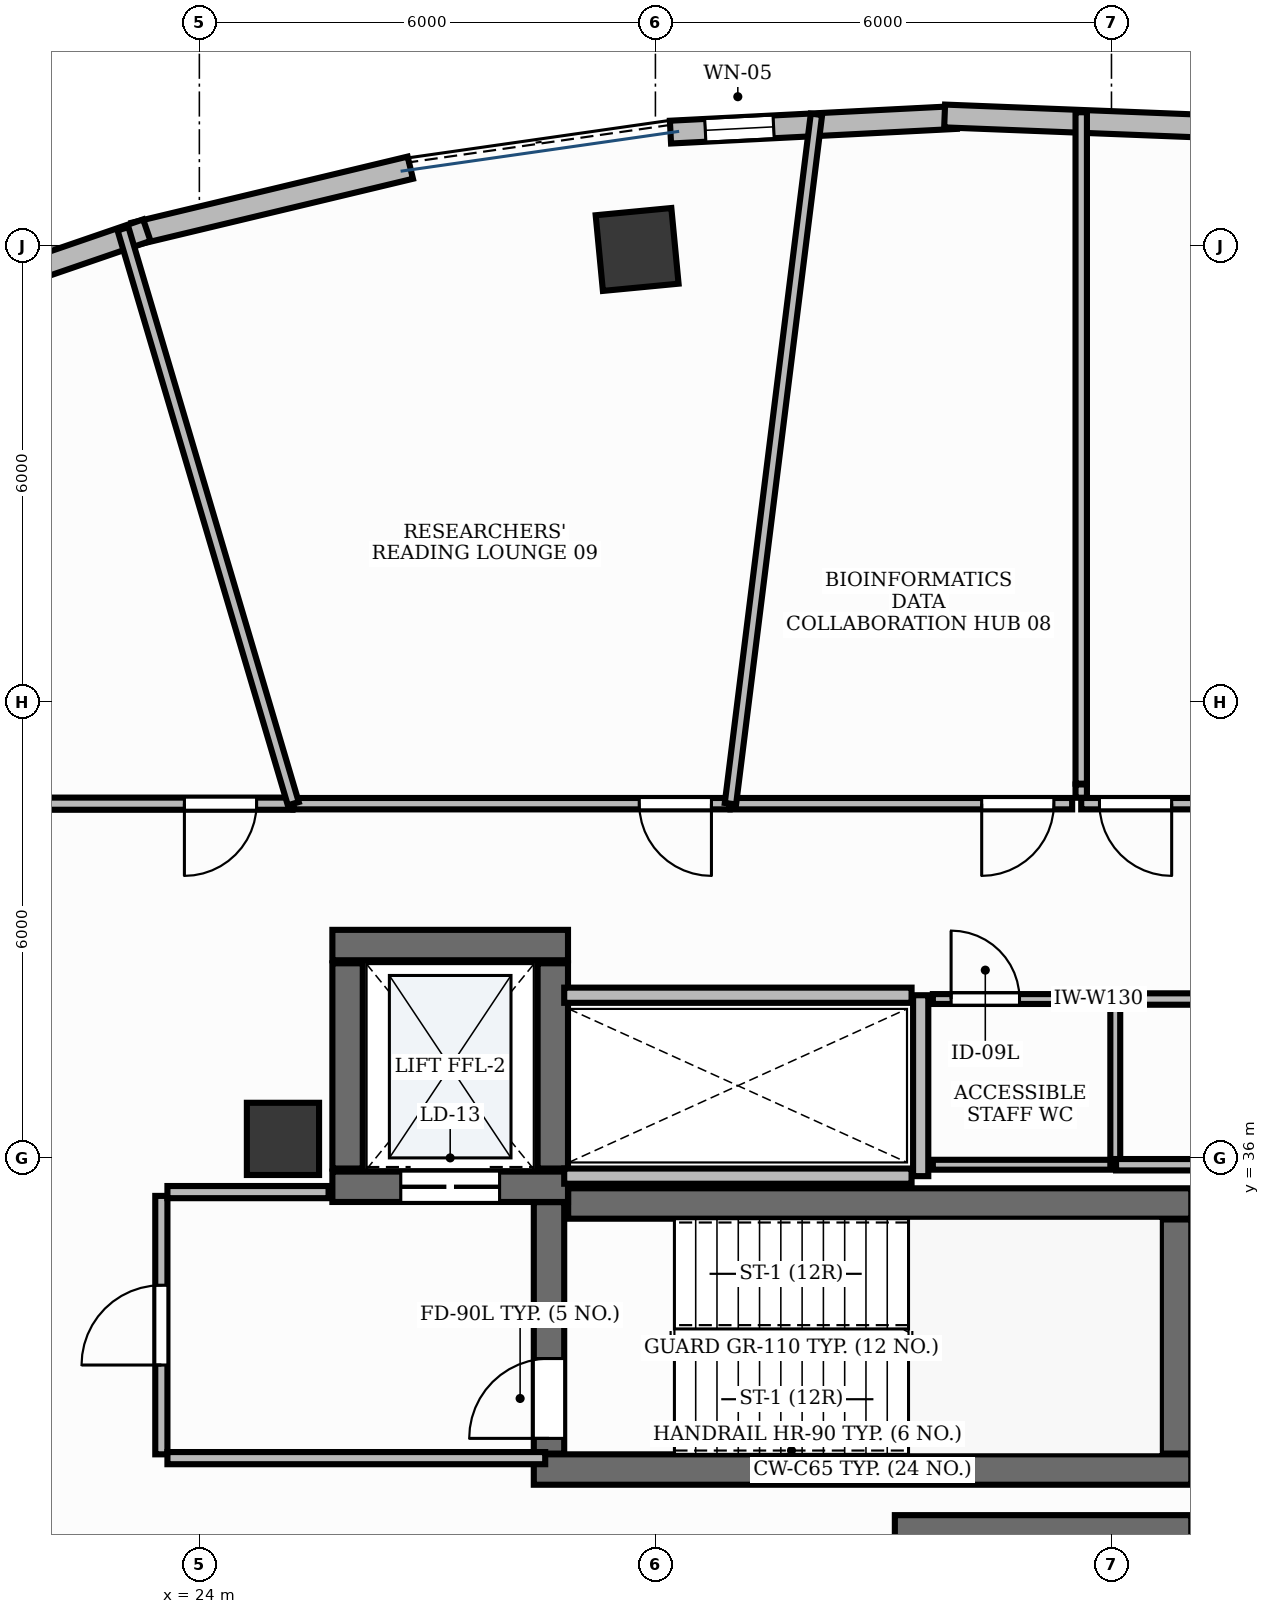
"""IFC4 building model, lengths in metres.
Left out: names, types, materials, properties, quantities, classifications, styles, units other than length and angle.
Written with IfcOpenShell. Run it as: python <this file> out.ifc"""

import sys

from ifc_helpers import new_model, si_unit, direction, frame, frame_2d, origin, origin_2d, place, context, subcontext, project, spatial, rectangle, extrude, element, fill, save


model = new_model("IFC4")
c1 = context("Model", 3, precision=1e-05, world=origin(), true_north=direction((0.0, 1.0)))
c2 = subcontext(c1, "Body", "Model", "MODEL_VIEW")
j1 = project(units=[si_unit("LENGTHUNIT", "METRE"), si_unit("PLANEANGLEUNIT", "RADIAN")], contexts=[c1])
p1 = place(None, origin())
s1 = spatial("IfcSite", under=j1, at=p1, CompositionType="ELEMENT")
p2 = place(p1, origin())
s2 = spatial("IfcBuilding", under=s1, at=p2, CompositionType="ELEMENT")
p3 = place(p2, frame((0.0, 0.0, 226.8)))
s3 = spatial("IfcBuildingStorey", under=s2, at=p3, CompositionType="ELEMENT", Elevation=226.8)
p4 = place(p3, frame((28.852, 35.4, 0.0), z_axis=(0.0, 0.0, 1.0), x_axis=(1.0, 0.0, 0.0)))
e1 = element("IfcWall", 1, at=p4, inside=s3, PredefinedType="SHEAR", context=c2, shape_type="SweptSolid", body=[
    extrude(rectangle(XDim=8.198, YDim=0.4, at=frame_2d((4.099, 0.0))), origin(), (0.0, 0.0, 1.0), 3.9),
])
p5 = place(p3, frame((28.4, 31.9, 0.0), z_axis=(0.0, 0.0, 1.0), x_axis=(1.0, 0.0, 0.0)))
e2 = element("IfcWall", 2, at=p5, inside=s3, PredefinedType="SHEAR", context=c2, shape_type="SweptSolid", body=[
    extrude(rectangle(XDim=8.65, YDim=0.4, at=frame_2d((4.325, 0.0))), origin(), (0.0, 0.0, 1.0), 3.9),
])
p6 = place(p3, frame((36.85, 32.11, 0.0), z_axis=(0.0, 0.0, 1.0), x_axis=(0.0, 1.0, 0.0)))
e3 = element("IfcWall", 3, at=p6, inside=s3, PredefinedType="SHEAR", context=c2, shape_type="SweptSolid", body=[
    extrude(rectangle(XDim=3.08, YDim=0.4, at=frame_2d((1.54, 0.0))), origin(), (0.0, 0.0, 1.0), 3.9),
])
p7 = place(p3, frame((28.6, 32.11, 0.0), z_axis=(0.0, 0.0, 1.0), x_axis=(0.0, 1.0, 0.0)))
e4 = element("IfcWall", 4, at=p7, inside=s3, PredefinedType="SHEAR", context=c2, shape_type="SweptSolid", body=[
    extrude(rectangle(XDim=3.308, YDim=0.4, at=frame_2d((1.654, 0.0))), origin(), (0.0, 0.0, 1.0), 3.9),
])
p8 = place(p7, frame((0.2, 0.0, 0.0)))
e5 = element("IfcOpeningElement", 5, at=p8, cuts=e4, PredefinedType="OPENING", context=c2, shape_type="SweptSolid", body=[
    extrude(rectangle(XDim=1.05, YDim=2.15, at=frame_2d((0.525, 1.075))), frame((0.0, 0.215, 0.0), z_axis=(0.0, -1.0, 0.0), x_axis=(1.0, 0.0, 0.0)), (0.0, 0.0, 1.0), 0.43),
])
p9 = place(p3, frame((33.15, 31.1, 0.0), z_axis=(0.0, 0.0, 1.0), x_axis=(1.0, 0.0, 0.0)))
e6 = element("IfcWall", 6, at=p9, inside=s3, PredefinedType="SHEAR", context=c2, shape_type="SweptSolid", body=[
    extrude(rectangle(XDim=3.9, YDim=0.4, at=frame_2d((1.95, 0.0))), origin(), (0.0, 0.0, 1.0), 3.9),
])
p10 = place(p3, frame((25.75, 38.8, 0.0), z_axis=(0.0, 0.0, 1.0), x_axis=(1.0, 0.0, 0.0)))
e7 = element("IfcWall", 7, at=p10, inside=s3, PredefinedType="SHEAR", context=c2, shape_type="SweptSolid", body=[
    extrude(rectangle(XDim=3.1, YDim=0.4, at=frame_2d((1.55, 0.0))), origin(), (0.0, 0.0, 1.0), 3.9),
])
p11 = place(p3, frame((25.75, 35.62, 0.0), z_axis=(0.0, 0.0, 1.0), x_axis=(1.0, 0.0, 0.0)))
e8 = element("IfcWall", 8, at=p11, inside=s3, PredefinedType="SHEAR", context=c2, shape_type="SweptSolid", body=[
    extrude(rectangle(XDim=3.1, YDim=0.4, at=frame_2d((1.55, 0.0))), origin(), (0.0, 0.0, 1.0), 3.9),
])
p12 = place(p11, frame((0.9, 0.0, 0.0)))
e9 = element("IfcOpeningElement", 9, at=p12, cuts=e8, PredefinedType="OPENING", context=c2, shape_type="SweptSolid", body=[
    extrude(rectangle(XDim=1.3, YDim=2.2, at=frame_2d((0.65, 1.1))), frame((0.0, 0.215, 0.0), z_axis=(0.0, -1.0, 0.0), x_axis=(1.0, 0.0, 0.0)), (0.0, 0.0, 1.0), 0.43),
])
for number, where, z_axis, x_axis in (
    (10, (25.95, 35.86, 0.0), (0.0, 0.0, 1.0), (0.0, 1.0, 0.0)),
    (11, (28.65, 35.86, 0.0), (0.0, 0.0, 1.0), (0.0, 1.0, 0.0)),
):
    element("IfcWall", number, at=place(p3, frame(where, z_axis=z_axis, x_axis=x_axis)), inside=s3, PredefinedType="SHEAR", context=c2, shape_type="SweptSolid", body=[
        extrude(rectangle(XDim=2.7, YDim=0.4, at=frame_2d((1.35, 0.0))), origin(), (0.0, 0.0, 1.0), 3.9),
    ])
p13 = place(p3, frame((25.1, 36.25, -0.0), z_axis=(0.0, 0.0, 1.0), x_axis=(1.0, 0.0, 0.0)))
e12 = element("IfcColumn", 12, at=p13, inside=s3, PredefinedType="PILASTER", context=c2, shape_type="SweptSolid", body=[
    extrude(rectangle(XDim=0.95, YDim=0.95, at=origin_2d()), origin(), (0.0, 0.0, 1.0), 3.901),
])
p14 = place(p3, frame((29.759, 47.951, -0.0), z_axis=(0.0, 0.0, 1.0), x_axis=(0.995462868748, 0.095150811579, 0.0)))
e13 = element("IfcColumn", 13, at=p14, inside=s3, PredefinedType="COLUMN", context=c2, shape_type="SweptSolid", body=[
    extrude(rectangle(XDim=1.0, YDim=1.0, at=origin_2d()), origin(), (0.0, 0.0, 1.0), 3.901),
])
p15 = place(p3, frame((33.958, 49.688, 0.0), z_axis=(0.0, 0.0, 1.0), x_axis=(-0.998693948377, -0.051092049037, 0.0)))
e14 = element("IfcWall", 14, at=p15, inside=s3, PredefinedType="STANDARD", context=c2, shape_type="SweptSolid", body=[
    extrude(rectangle(XDim=3.765, YDim=0.3, at=frame_2d((1.883, 0.0))), origin(), (0.0, 0.0, 1.0), 3.47),
])
p16 = place(p15, frame((2.407, 0.0, 0.95)))
e15 = element("IfcOpeningElement", 15, at=p16, cuts=e14, PredefinedType="OPENING", context=c2, shape_type="SweptSolid", body=[
    extrude(rectangle(XDim=0.9, YDim=1.8, at=frame_2d((0.45, 0.9))), frame((0.0, 0.165, 0.0), z_axis=(0.0, -1.0, 0.0), x_axis=(1.0, 0.0, 0.0)), (0.0, 0.0, 1.0), 0.33),
])
p17 = place(p3, frame((37.609, 49.557, 0.0), z_axis=(0.0, 0.0, 1.0), x_axis=(-0.999221923177, 0.039440439173, 0.0)))
e16 = element("IfcWall", 16, at=p17, inside=s3, PredefinedType="STANDARD", context=c2, shape_type="SweptSolid", body=[
    extrude(rectangle(XDim=3.807, YDim=0.3, at=frame_2d((1.903, 0.0))), origin(), (0.0, 0.0, 1.0), 3.9),
])
p18 = place(p3, frame((26.775, 49.027, 0.0), z_axis=(0.0, 0.0, 1.0), x_axis=(-0.972475629939, -0.233004611918, 0.0)))
e17 = element("IfcWall", 17, at=p18, inside=s3, PredefinedType="STANDARD", context=c2, shape_type="SweptSolid", body=[
    extrude(rectangle(XDim=3.735, YDim=0.3, at=frame_2d((1.868, 0.0))), origin(), (0.0, 0.0, 1.0), 3.9),
])
p19 = place(p3, frame((23.309, 48.205, 0.0), z_axis=(0.0, 0.0, 1.0), x_axis=(-0.945722383555, -0.32497565023, 0.0)))
e18 = element("IfcWall", 18, at=p19, inside=s3, PredefinedType="STANDARD", context=c2, shape_type="SweptSolid", body=[
    extrude(rectangle(XDim=3.67, YDim=0.3, at=frame_2d((1.835, 0.0))), origin(), (0.0, 0.0, 1.0), 3.9),
])
p20 = place(p3, frame((33.49, 35.76, 0.0), z_axis=(0.0, 0.0, 1.0), x_axis=(0.0, 1.0, 0.0)))
e19 = element("IfcWall", 19, at=p20, inside=s3, PredefinedType="PARTITIONING", context=c2, shape_type="SweptSolid", body=[
    extrude(rectangle(XDim=2.38, YDim=0.2, at=frame_2d((1.19, 0.0))), origin(), (0.0, 0.0, 1.0), 2.91),
])
for number, where, z_axis, x_axis in (
    (20, (28.8, 35.76, 0.0), (0.0, 0.0, 1.0), (1.0, 0.0, 0.0)),
    (21, (28.8, 38.14, 0.0), (0.0, 0.0, 1.0), (1.0, 0.0, 0.0)),
):
    element("IfcWall", number, at=place(p3, frame(where, z_axis=z_axis, x_axis=x_axis)), inside=s3, PredefinedType="PARTITIONING", context=c2, shape_type="SweptSolid", body=[
        extrude(rectangle(XDim=4.57, YDim=0.2, at=frame_2d((2.285, 0.0))), origin(), (0.0, 0.0, 1.0), 2.91),
    ])
p21 = place(p3, frame((23.5, 32.1, 0.0), z_axis=(0.0, 0.0, 1.0), x_axis=(0.0, 1.0, 0.0)))
e22 = element("IfcWall", 22, at=p21, inside=s3, PredefinedType="PARTITIONING", context=c2, shape_type="SweptSolid", body=[
    extrude(rectangle(XDim=3.4, YDim=0.16, at=frame_2d((1.7, 0.0))), origin(), (0.0, 0.0, 1.0), 2.91),
])
p22 = place(p21, frame((1.175, 0.0, 0.0)))
e23 = element("IfcOpeningElement", 23, at=p22, cuts=e22, PredefinedType="OPENING", context=c2, shape_type="SweptSolid", body=[
    extrude(rectangle(XDim=1.05, YDim=2.15, at=frame_2d((0.525, 1.075))), frame((0.0, 0.095, 0.0), z_axis=(0.0, -1.0, 0.0), x_axis=(1.0, 0.0, 0.0)), (0.0, 0.0, 1.0), 0.19),
])
p23 = place(p3, frame((23.58, 32.05, 0.0), z_axis=(0.0, 0.0, 1.0), x_axis=(1.0, 0.0, 0.0)))
e24 = element("IfcWall", 24, at=p23, inside=s3, PredefinedType="PARTITIONING", context=c2, shape_type="SweptSolid", body=[
    extrude(rectangle(XDim=4.97, YDim=0.16, at=frame_2d((2.485, 0.0))), origin(), (0.0, 0.0, 1.0), 2.91),
])
p24 = place(p3, frame((23.58, 35.55, 0.0), z_axis=(0.0, 0.0, 1.0), x_axis=(1.0, 0.0, 0.0)))
e25 = element("IfcWall", 25, at=p24, inside=s3, PredefinedType="PARTITIONING", context=c2, shape_type="SweptSolid", body=[
    extrude(rectangle(XDim=2.12, YDim=0.16, at=frame_2d((1.06, 0.0))), origin(), (0.0, 0.0, 1.0), 2.91),
])
p25 = place(p3, frame((33.65, 38.09, 0.0), z_axis=(0.0, 0.0, 1.0), x_axis=(1.0, 0.0, 0.0)))
e26 = element("IfcWall", 26, at=p25, inside=s3, PredefinedType="PARTITIONING", context=c2, shape_type="SweptSolid", body=[
    extrude(rectangle(XDim=2.4, YDim=0.13, at=frame_2d((1.2, 0.0))), origin(), (0.0, 0.0, 1.0), 2.91),
])
p26 = place(p25, frame((0.24, 0.0, 0.0)))
e27 = element("IfcOpeningElement", 27, at=p26, cuts=e26, PredefinedType="OPENING", context=c2, shape_type="SweptSolid", body=[
    extrude(rectangle(XDim=0.9, YDim=2.15, at=frame_2d((0.45, 1.075))), frame((0.0, 0.08, 0.0), z_axis=(0.0, -1.0, 0.0), x_axis=(1.0, 0.0, 0.0)), (0.0, 0.0, 1.0), 0.16),
])
p27 = place(p3, frame((37.2, 40.66, 0.0), z_axis=(0.0, 0.0, 1.0), x_axis=(-1.0, 0.0, 0.0)))
e28 = element("IfcWall", 28, at=p27, inside=s3, PredefinedType="PARTITIONING", context=c2, shape_type="SweptSolid", body=[
    extrude(rectangle(XDim=1.598, YDim=0.15, at=frame_2d((0.799, 0.0))), origin(), (0.0, 0.0, 1.0), 2.91),
])
p28 = place(p27, frame((0.408, 0.0, 0.0)))
e29 = element("IfcOpeningElement", 29, at=p28, cuts=e28, PredefinedType="OPENING", context=c2, shape_type="SweptSolid", body=[
    extrude(rectangle(XDim=0.95, YDim=2.15, at=frame_2d((0.475, 1.075))), frame((0.0, 0.09, 0.0), z_axis=(0.0, -1.0, 0.0), x_axis=(1.0, 0.0, 0.0)), (0.0, 0.0, 1.0), 0.18),
])
p29 = place(p3, frame((35.483, 40.66, 0.0), z_axis=(0.0, 0.0, 1.0), x_axis=(-1.0, 0.0, 0.0)))
e30 = element("IfcWall", 30, at=p29, inside=s3, PredefinedType="PARTITIONING", context=c2, shape_type="SweptSolid", body=[
    extrude(rectangle(XDim=4.496, YDim=0.15, at=frame_2d((2.248, 0.0))), origin(), (0.0, 0.0, 1.0), 2.91),
])
p30 = place(p29, frame((0.24, 0.0, 0.0)))
e31 = element("IfcOpeningElement", 31, at=p30, cuts=e30, PredefinedType="OPENING", context=c2, shape_type="SweptSolid", body=[
    extrude(rectangle(XDim=0.95, YDim=2.15, at=frame_2d((0.475, 1.075))), frame((0.0, 0.09, 0.0), z_axis=(0.0, -1.0, 0.0), x_axis=(1.0, 0.0, 0.0)), (0.0, 0.0, 1.0), 0.18),
])
p31 = place(p3, frame((30.977, 40.66, 0.0), z_axis=(0.0, 0.0, 1.0), x_axis=(-1.0, 0.0, 0.0)))
e32 = element("IfcWall", 32, at=p31, inside=s3, PredefinedType="PARTITIONING", context=c2, shape_type="SweptSolid", body=[
    extrude(rectangle(XDim=5.741, YDim=0.15, at=frame_2d((2.871, 0.0))), origin(), (0.0, 0.0, 1.0), 2.91),
])
p32 = place(p31, frame((0.24, 0.0, 0.0)))
e33 = element("IfcOpeningElement", 33, at=p32, cuts=e32, PredefinedType="OPENING", context=c2, shape_type="SweptSolid", body=[
    extrude(rectangle(XDim=0.95, YDim=2.15, at=frame_2d((0.475, 1.075))), frame((0.0, 0.09, 0.0), z_axis=(0.0, -1.0, 0.0), x_axis=(1.0, 0.0, 0.0)), (0.0, 0.0, 1.0), 0.18),
])
p33 = place(p3, frame((25.226, 40.66, 0.0), z_axis=(0.0, 0.0, 1.0), x_axis=(-1.0, 0.0, 0.0)))
e34 = element("IfcWall", 34, at=p33, inside=s3, PredefinedType="PARTITIONING", context=c2, shape_type="SweptSolid", body=[
    extrude(rectangle(XDim=3.476, YDim=0.16, at=frame_2d((1.738, 0.0))), origin(), (0.0, 0.0, 1.0), 2.91),
])
p34 = place(p33, frame((0.472, 0.0, 0.0)))
e35 = element("IfcOpeningElement", 35, at=p34, cuts=e34, PredefinedType="OPENING", context=c2, shape_type="SweptSolid", body=[
    extrude(rectangle(XDim=0.95, YDim=2.15, at=frame_2d((0.475, 1.075))), frame((0.0, 0.095, 0.0), z_axis=(0.0, -1.0, 0.0), x_axis=(1.0, 0.0, 0.0)), (0.0, 0.0, 1.0), 0.19),
])
p35 = place(p3, frame((36.05, 35.91, 0.0), z_axis=(0.0, 0.0, 1.0), x_axis=(-1.0, 0.0, 0.0)))
e36 = element("IfcWall", 36, at=p35, inside=s3, PredefinedType="PARTITIONING", context=c2, shape_type="SweptSolid", body=[
    extrude(rectangle(XDim=2.4, YDim=0.13, at=frame_2d((1.2, 0.0))), origin(), (0.0, 0.0, 1.0), 2.91),
])
p36 = place(p3, frame((36.05, 38.09, 0.0), z_axis=(0.0, 0.0, 1.0), x_axis=(0.0, -1.0, 0.0)))
e37 = element("IfcWall", 37, at=p36, inside=s3, PredefinedType="PARTITIONING", context=c2, shape_type="SweptSolid", body=[
    extrude(rectangle(XDim=2.18, YDim=0.13, at=frame_2d((1.09, 0.0))), origin(), (0.0, 0.0, 1.0), 2.91),
])
p37 = place(p3, frame((35.602, 40.923, 0.0), z_axis=(0.0, 0.0, 1.0), x_axis=(0.0, 1.0, 0.0)))
e38 = element("IfcWall", 38, at=p37, inside=s3, PredefinedType="PARTITIONING", context=c2, shape_type="SweptSolid", body=[
    extrude(rectangle(XDim=8.833, YDim=0.15, at=frame_2d((4.417, 0.0))), origin(), (0.0, 0.0, 1.0), 2.91),
])
p38 = place(p3, frame((37.35, 35.91, 0.0), z_axis=(0.0, 0.0, 1.0), x_axis=(-1.0, 0.0, 0.0)))
e39 = element("IfcWall", 39, at=p38, inside=s3, PredefinedType="PARTITIONING", context=c2, shape_type="SweptSolid", body=[
    extrude(rectangle(XDim=1.29, YDim=0.15, at=frame_2d((0.645, 0.0))), origin(), (0.0, 0.0, 1.0), 2.91),
])
p39 = place(p3, frame((36.06, 38.09, 0.0), z_axis=(0.0, 0.0, 1.0), x_axis=(1.0, 0.0, 0.0)))
e40 = element("IfcWall", 40, at=p39, inside=s3, PredefinedType="PARTITIONING", context=c2, shape_type="SweptSolid", body=[
    extrude(rectangle(XDim=1.14, YDim=0.15, at=frame_2d((0.57, 0.0))), origin(), (0.0, 0.0, 1.0), 2.91),
])
p40 = place(p3, frame((35.602, 40.738, 0.0), z_axis=(0.0, 0.0, 1.0), x_axis=(0.0, 1.0, 0.0)))
e41 = element("IfcWall", 41, at=p40, inside=s3, PredefinedType="PARTITIONING", context=c2, shape_type="SweptSolid", body=[
    extrude(rectangle(XDim=0.175, YDim=0.15, at=frame_2d((0.087, 0.0))), origin(), (0.0, 0.0, 1.0), 2.91),
])
p41 = place(p3, frame((30.987, 40.66, 0.0), z_axis=(0.0, 0.0, 1.0), x_axis=(0.123837473271, 0.992302514465, 0.0)))
e42 = element("IfcWall", 42, at=p41, inside=s3, PredefinedType="PARTITIONING", context=c2, shape_type="SweptSolid", body=[
    extrude(rectangle(XDim=9.14, YDim=0.15, at=frame_2d((4.57, 0.0))), origin(), (0.0, 0.0, 1.0), 2.91),
])
p42 = place(p3, frame((25.236, 40.66, 0.0), z_axis=(0.0, 0.0, 1.0), x_axis=(-0.284007193362, 0.958822149368, 0.0)))
e43 = element("IfcWall", 43, at=p42, inside=s3, PredefinedType="PARTITIONING", context=c2, shape_type="SweptSolid", body=[
    extrude(rectangle(XDim=7.889, YDim=0.15, at=frame_2d((3.944, 0.0))), origin(), (0.0, 0.0, 1.0), 2.91),
])
p43 = place(p16, origin())
e44 = element("IfcWindow", 44, at=p43, inside=s3, PartitioningType="SINGLE_PANEL", PredefinedType="WINDOW", context=c2, shape_type="SweptSolid", body=[
    extrude(rectangle(XDim=0.9, YDim=1.8, at=frame_2d((0.45, 0.9))), frame((0.0, 0.03, 0.0), z_axis=(0.0, -1.0, 0.0), x_axis=(1.0, 0.0, 0.0)), (0.0, 0.0, 1.0), 0.06),
])
fill(e15, e44)
p44 = place(p8, origin())
e45 = element("IfcDoor", 45, at=p44, inside=s3, OperationType="SINGLE_SWING_LEFT", PredefinedType="DOOR", context=c2, shape_type="SweptSolid", body=[
    extrude(rectangle(XDim=1.05, YDim=2.15, at=frame_2d((0.525, 1.075))), frame((0.0, 0.025, 0.0), z_axis=(0.0, -1.0, 0.0), x_axis=(1.0, 0.0, 0.0)), (0.0, 0.0, 1.0), 0.05),
])
fill(e5, e45)
p45 = place(p12, origin())
e46 = element("IfcDoor", 46, at=p45, inside=s3, OperationType="DOUBLE_DOOR_SLIDING", PredefinedType="DOOR", context=c2, shape_type="SweptSolid", body=[
    extrude(rectangle(XDim=1.3, YDim=2.2, at=frame_2d((0.65, 1.1))), frame((0.0, 0.025, 0.0), z_axis=(0.0, -1.0, 0.0), x_axis=(1.0, 0.0, 0.0)), (0.0, 0.0, 1.0), 0.05),
])
fill(e9, e46)
p46 = place(p22, origin())
e47 = element("IfcDoor", 47, at=p46, inside=s3, OperationType="SINGLE_SWING_LEFT", PredefinedType="DOOR", context=c2, shape_type="SweptSolid", body=[
    extrude(rectangle(XDim=1.05, YDim=2.15, at=frame_2d((0.525, 1.075))), frame((0.0, 0.025, 0.0), z_axis=(0.0, -1.0, 0.0), x_axis=(1.0, 0.0, 0.0)), (0.0, 0.0, 1.0), 0.05),
])
fill(e23, e47)
p47 = place(p26, origin())
e48 = element("IfcDoor", 48, at=p47, inside=s3, OperationType="SINGLE_SWING_LEFT", PredefinedType="DOOR", context=c2, shape_type="SweptSolid", body=[
    extrude(rectangle(XDim=0.9, YDim=2.15, at=frame_2d((0.45, 1.075))), frame((0.0, 0.025, 0.0), z_axis=(0.0, -1.0, 0.0), x_axis=(1.0, 0.0, 0.0)), (0.0, 0.0, 1.0), 0.05),
])
fill(e27, e48)
p48 = place(p28, origin())
e49 = element("IfcDoor", 49, at=p48, inside=s3, OperationType="SINGLE_SWING_LEFT", PredefinedType="DOOR", context=c2, shape_type="SweptSolid", body=[
    extrude(rectangle(XDim=0.95, YDim=2.15, at=frame_2d((0.475, 1.075))), frame((0.0, 0.025, 0.0), z_axis=(0.0, -1.0, 0.0), x_axis=(1.0, 0.0, 0.0)), (0.0, 0.0, 1.0), 0.05),
])
fill(e29, e49)
p49 = place(p30, origin())
e50 = element("IfcDoor", 50, at=p49, inside=s3, OperationType="SINGLE_SWING_RIGHT", PredefinedType="DOOR", context=c2, shape_type="SweptSolid", body=[
    extrude(rectangle(XDim=0.95, YDim=2.15, at=frame_2d((0.475, 1.075))), frame((0.0, 0.025, 0.0), z_axis=(0.0, -1.0, 0.0), x_axis=(1.0, 0.0, 0.0)), (0.0, 0.0, 1.0), 0.05),
])
fill(e31, e50)
p50 = place(p32, origin())
e51 = element("IfcDoor", 51, at=p50, inside=s3, OperationType="SINGLE_SWING_LEFT", PredefinedType="DOOR", context=c2, shape_type="SweptSolid", body=[
    extrude(rectangle(XDim=0.95, YDim=2.15, at=frame_2d((0.475, 1.075))), frame((0.0, 0.025, 0.0), z_axis=(0.0, -1.0, 0.0), x_axis=(1.0, 0.0, 0.0)), (0.0, 0.0, 1.0), 0.05),
])
fill(e33, e51)
p51 = place(p34, origin())
e52 = element("IfcDoor", 52, at=p51, inside=s3, OperationType="SINGLE_SWING_RIGHT", PredefinedType="DOOR", context=c2, shape_type="SweptSolid", body=[
    extrude(rectangle(XDim=0.95, YDim=2.15, at=frame_2d((0.475, 1.075))), frame((0.0, 0.025, 0.0), z_axis=(0.0, -1.0, 0.0), x_axis=(1.0, 0.0, 0.0)), (0.0, 0.0, 1.0), 0.05),
])
fill(e35, e52)
save(model, sys.argv[1])
